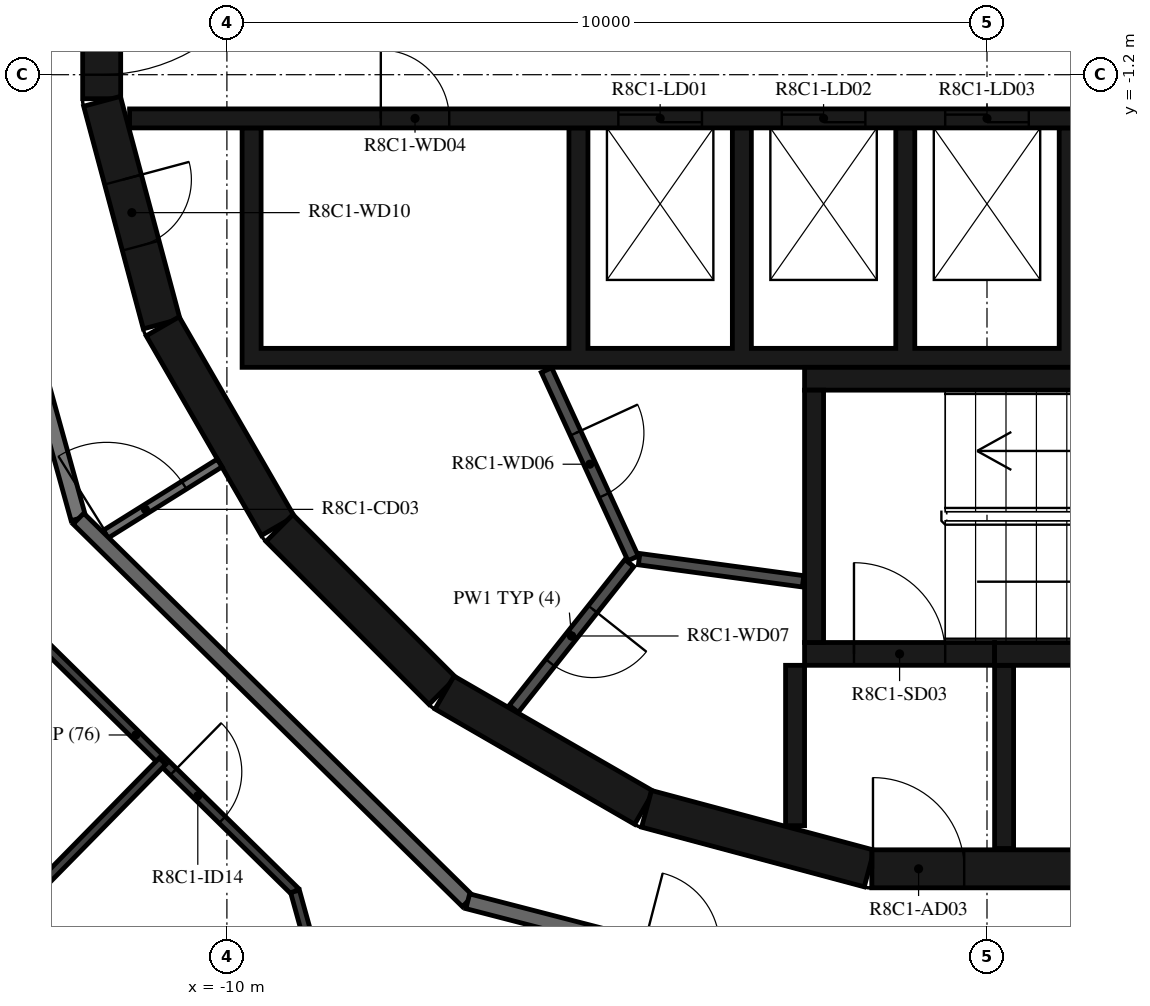
"""IFC4 building model, lengths in metres.
Left out: names, types, materials, properties, quantities, classifications, styles, units other than length and angle.
Written with IfcOpenShell. Run it as: python <this file> out.ifc"""

import sys

from ifc_helpers import new_model, si_unit, direction, frame, frame_2d, origin, place, context, subcontext, project, spatial, polyline, rectangle, outline, extrude, element, fill, save


model = new_model("IFC4")
c1 = context("Model", 3, precision=1e-05, world=origin(), true_north=direction((0.0, 1.0)))
c2 = subcontext(c1, "Body", "Model", "MODEL_VIEW")
j1 = project(units=[si_unit("LENGTHUNIT", "METRE"), si_unit("PLANEANGLEUNIT", "RADIAN")], contexts=[c1])
p1 = place(None, origin())
s1 = spatial("IfcSite", under=j1, at=p1, CompositionType="ELEMENT")
p2 = place(p1, origin())
s2 = spatial("IfcBuilding", under=s1, at=p2, CompositionType="ELEMENT")
p3 = place(p2, frame((0.0, 0.0, 322.7)))
s3 = spatial("IfcBuildingStorey", under=s2, at=p3, CompositionType="ELEMENT", Elevation=322.7)
p4 = place(p3, frame((-11.647, 1.516, 0.0), z_axis=(0.0, 0.0, 1.0), x_axis=(0.0, -1.0, 0.0)))
e1 = element("IfcWall", 1, at=p4, inside=s3, PredefinedType="SHEAR", context=c2, shape_type="SweptSolid", body=[
    extrude(rectangle(XDim=3.033, YDim=0.5, at=frame_2d((1.516, 0.0))), origin(), (0.0, 0.0, 1.0), 3.05),
])
p5 = place(p4, frame((0.316, 0.0, 0.0)))
e2 = element("IfcOpeningElement", 2, at=p5, cuts=e1, PredefinedType="OPENING", context=c2, shape_type="SweptSolid", body=[
    extrude(rectangle(XDim=2.4, YDim=2.1, at=frame_2d((1.2, 1.05))), frame((0.0, 0.26, 0.0), z_axis=(0.0, -1.0, 0.0), x_axis=(1.0, 0.0, 0.0)), (0.0, 0.0, 1.0), 0.52),
])
p6 = place(p3, frame((-11.643, -1.55, 0.0), z_axis=(0.0, 0.0, 1.0), x_axis=(0.258734743916, -0.965948410781, 0.0)))
e3 = element("IfcWall", 3, at=p6, inside=s3, PredefinedType="SHEAR", context=c2, shape_type="SweptSolid", body=[
    extrude(rectangle(XDim=3.033, YDim=0.5, at=frame_2d((1.516, 0.0))), origin(), (0.0, 0.0, 1.0), 3.05),
])
p7 = place(p6, frame((1.066, 0.0, 0.0)))
e4 = element("IfcOpeningElement", 4, at=p7, cuts=e3, PredefinedType="OPENING", context=c2, shape_type="SweptSolid", body=[
    extrude(rectangle(XDim=0.9, YDim=2.1, at=frame_2d((0.45, 1.05))), frame((0.0, 0.26, 0.0), z_axis=(0.0, -1.0, 0.0), x_axis=(1.0, 0.0, 0.0)), (0.0, 0.0, 1.0), 0.52),
])
p8 = place(p3, frame((-10.845, -4.51, 0.0), z_axis=(0.0, 0.0, 1.0), x_axis=(0.500087131594, -0.865975092491, 0.0)))
e5 = element("IfcWall", 5, at=p8, inside=s3, PredefinedType="SHEAR", context=c2, shape_type="SweptSolid", body=[
    extrude(rectangle(XDim=3.033, YDim=0.5, at=frame_2d((1.516, 0.0))), origin(), (0.0, 0.0, 1.0), 3.05),
])
p9 = place(p3, frame((-9.308, -7.164, 0.0), z_axis=(0.0, 0.0, 1.0), x_axis=(0.707106781187, -0.707106781187, 0.0)))
e6 = element("IfcWall", 6, at=p9, inside=s3, PredefinedType="SHEAR", context=c2, shape_type="SweptSolid", body=[
    extrude(rectangle(XDim=3.032, YDim=0.5, at=frame_2d((1.516, 0.0))), origin(), (0.0, 0.0, 1.0), 3.05),
])
for number, where, z_axis, x_axis in (
    (7, (-7.137, -9.329, 0.0), (0.0, 0.0, 1.0), (0.866, -0.5, 0.0)),
    (8, (-4.479, -10.858, 0.0), (0.0, 0.0, 1.0), (0.966, -0.259, 0.0)),
):
    element("IfcWall", number, at=place(p3, frame(where, z_axis=z_axis, x_axis=x_axis)), inside=s3, PredefinedType="SHEAR", context=c2, shape_type="SweptSolid", body=[
        extrude(rectangle(XDim=3.033, YDim=0.5, at=frame_2d((1.516, 0.0))), origin(), (0.0, 0.0, 1.0), 3.05),
    ])
p10 = place(p3, frame((-1.516, -11.647, 0.0), z_axis=(0.0, 0.0, 1.0), x_axis=(1.0, 0.0, 0.0)))
e9 = element("IfcWall", 9, at=p10, inside=s3, PredefinedType="SHEAR", context=c2, shape_type="SweptSolid", body=[
    extrude(rectangle(XDim=3.033, YDim=0.5, at=frame_2d((1.516, 0.0))), origin(), (0.0, 0.0, 1.0), 3.05),
])
p11 = place(p10, frame((0.016, 0.0, 0.0)))
e10 = element("IfcOpeningElement", 10, at=p11, cuts=e9, PredefinedType="OPENING", context=c2, shape_type="SweptSolid", body=[
    extrude(rectangle(XDim=1.2, YDim=2.1, at=frame_2d((0.6, 1.05))), frame((0.0, 0.26, 0.0), z_axis=(0.0, -1.0, 0.0), x_axis=(1.0, 0.0, 0.0)), (0.0, 0.0, 1.0), 0.52),
])
p12 = place(p3, frame((-2.275, -8.67, 0.0), z_axis=(0.0, 0.0, 1.0), x_axis=(0.0, 1.0, 0.0)))
e11 = element("IfcWall", 11, at=p12, inside=s3, PredefinedType="SHEAR", context=c2, shape_type="SweptSolid", body=[
    extrude(rectangle(XDim=3.32, YDim=0.25, at=frame_2d((1.66, 0.0))), origin(), (0.0, 0.0, 1.0), 3.05),
])
p13 = place(p3, frame((-2.4, -5.2, 0.0), z_axis=(0.0, 0.0, 1.0), x_axis=(1.0, 0.0, 0.0)))
e12 = element("IfcWall", 12, at=p13, inside=s3, PredefinedType="SHEAR", context=c2, shape_type="SweptSolid", body=[
    extrude(rectangle(XDim=7.05, YDim=0.3, at=frame_2d((3.525, 0.0))), origin(), (0.0, 0.0, 1.0), 3.05),
])
p14 = place(p3, frame((0.1, -8.82, 0.0), z_axis=(0.0, 0.0, 1.0), x_axis=(1.0, 0.0, 0.0)))
e13 = element("IfcWall", 13, at=p14, inside=s3, PredefinedType="SHEAR", context=c2, shape_type="SweptSolid", body=[
    extrude(rectangle(XDim=4.55, YDim=0.3, at=frame_2d((2.275, 0.0))), origin(), (0.0, 0.0, 1.0), 3.05),
])
p15 = place(p3, frame((-2.4, -8.82, 0.0), z_axis=(0.0, 0.0, 1.0), x_axis=(1.0, 0.0, 0.0)))
e14 = element("IfcWall", 14, at=p15, inside=s3, PredefinedType="SHEAR", context=c2, shape_type="SweptSolid", body=[
    extrude(rectangle(XDim=2.5, YDim=0.3, at=frame_2d((1.25, 0.0))), origin(), (0.0, 0.0, 1.0), 3.05),
])
p16 = place(p15, frame((0.65, 0.0, 0.0)))
e15 = element("IfcOpeningElement", 15, at=p16, cuts=e14, PredefinedType="OPENING", context=c2, shape_type="SweptSolid", body=[
    extrude(rectangle(XDim=1.2, YDim=2.1, at=frame_2d((0.6, 1.05))), frame((0.0, 0.16, 0.0), z_axis=(0.0, -1.0, 0.0), x_axis=(1.0, 0.0, 0.0)), (0.0, 0.0, 1.0), 0.32),
])
p17 = place(p3, frame((-2.525, -8.97, 0.0), z_axis=(0.0, 0.0, 1.0), x_axis=(0.0, -1.0, 0.0)))
e16 = element("IfcWall", 16, at=p17, inside=s3, PredefinedType="SHEAR", context=c2, shape_type="SweptSolid", body=[
    extrude(rectangle(XDim=2.11, YDim=0.25, at=frame_2d((1.055, 0.0))), origin(), (0.0, 0.0, 1.0), 3.05),
])
p18 = place(p3, frame((0.225, -8.97, 0.0), z_axis=(0.0, 0.0, 1.0), x_axis=(0.0, -1.0, 0.0)))
e17 = element("IfcWall", 17, at=p18, inside=s3, PredefinedType="SHEAR", context=c2, shape_type="SweptSolid", body=[
    extrude(rectangle(XDim=2.41, YDim=0.25, at=frame_2d((1.205, 0.0))), origin(), (0.0, 0.0, 1.0), 3.05),
])
p19 = place(p3, origin())
e18 = element("IfcWall", 18, at=p19, inside=s3, PredefinedType="SHEAR", context=c2, shape_type="SweptSolid", body=[
    extrude(outline(polyline([(9.8, -5.05), (9.8, -4.8), (9.8, -1.9), (9.55, -1.9), (9.55, -4.8), (7.65, -4.8), (7.65, -1.9), (7.4, -1.9), (7.4, -4.8), (5.5, -4.8), (5.5, -1.9), (5.25, -1.9), (5.25, -4.8), (3.35, -4.8), (3.35, -1.9), (3.1, -1.9), (3.1, -4.8), (1.2, -4.8), (1.2, -1.9), (0.95, -1.9), (0.95, -4.8), (-0.95, -4.8), (-0.95, -1.9), (-1.2, -1.9), (-1.2, -4.8), (-3.1, -4.8), (-3.1, -1.9), (-3.35, -1.9), (-3.35, -4.8), (-5.25, -4.8), (-5.25, -1.9), (-5.5, -1.9), (-5.5, -4.8), (-9.55, -4.8), (-9.55, -1.9), (-9.8, -1.9), (-9.8, -4.8), (-9.8, -5.05), (9.8, -5.05)])), origin(), (0.0, 0.0, 1.0), 3.05),
])
p20 = place(p3, frame((-11.28, -1.775, 0.0), z_axis=(0.0, 0.0, 1.0), x_axis=(1.0, 0.0, 0.0)))
e19 = element("IfcWall", 19, at=p20, inside=s3, PredefinedType="SHEAR", context=c2, shape_type="SweptSolid", body=[
    extrude(rectangle(XDim=14.38, YDim=0.25, at=frame_2d((7.19, 0.0))), origin(), (0.0, 0.0, 1.0), 3.05),
])
p21 = place(p20, frame((6.43, 0.0, 0.0)))
e20 = element("IfcOpeningElement", 20, at=p21, cuts=e19, PredefinedType="OPENING", context=c2, shape_type="SweptSolid", body=[
    extrude(rectangle(XDim=1.1, YDim=2.1, at=frame_2d((0.55, 1.05))), frame((0.0, 0.135, 0.0), z_axis=(0.0, -1.0, 0.0), x_axis=(1.0, 0.0, 0.0)), (0.0, 0.0, 1.0), 0.27),
])
p22 = place(p20, frame((8.58, 0.0, 0.0)))
e21 = element("IfcOpeningElement", 21, at=p22, cuts=e19, PredefinedType="OPENING", context=c2, shape_type="SweptSolid", body=[
    extrude(rectangle(XDim=1.1, YDim=2.1, at=frame_2d((0.55, 1.05))), frame((0.0, 0.135, 0.0), z_axis=(0.0, -1.0, 0.0), x_axis=(1.0, 0.0, 0.0)), (0.0, 0.0, 1.0), 0.27),
])
p23 = place(p20, frame((10.73, 0.0, 0.0)))
e22 = element("IfcOpeningElement", 22, at=p23, cuts=e19, PredefinedType="OPENING", context=c2, shape_type="SweptSolid", body=[
    extrude(rectangle(XDim=1.1, YDim=2.1, at=frame_2d((0.55, 1.05))), frame((0.0, 0.135, 0.0), z_axis=(0.0, -1.0, 0.0), x_axis=(1.0, 0.0, 0.0)), (0.0, 0.0, 1.0), 0.27),
])
p24 = place(p20, frame((3.305, 0.0, 0.0)))
e23 = element("IfcOpeningElement", 23, at=p24, cuts=e19, PredefinedType="OPENING", context=c2, shape_type="SweptSolid", body=[
    extrude(rectangle(XDim=0.9, YDim=2.1, at=frame_2d((0.45, 1.05))), frame((0.0, 0.135, 0.0), z_axis=(0.0, -1.0, 0.0), x_axis=(1.0, 0.0, 0.0)), (0.0, 0.0, 1.0), 0.27),
])
p25 = place(p20, frame((12.98, 0.0, 0.0)))
e24 = element("IfcOpeningElement", 24, at=p25, cuts=e19, PredefinedType="OPENING", context=c2, shape_type="SweptSolid", body=[
    extrude(rectangle(XDim=0.9, YDim=2.1, at=frame_2d((0.45, 1.05))), frame((0.0, 0.135, 0.0), z_axis=(0.0, -1.0, 0.0), x_axis=(1.0, 0.0, 0.0)), (0.0, 0.0, 1.0), 0.27),
])
p26 = place(p3, frame((-5.795, -5.086, 0.0), z_axis=(0.0, 0.0, 1.0), x_axis=(0.417887867606, -0.908498613157, 0.0)))
e25 = element("IfcWall", 25, at=p26, inside=s3, PredefinedType="PARTITIONING", context=c2, shape_type="SweptSolid", body=[
    extrude(rectangle(XDim=2.726, YDim=0.15, at=frame_2d((1.363, 0.0))), origin(), (0.0, 0.0, 1.0), 3.05),
])
p27 = place(p26, frame((0.913, 0.0, 0.0)))
e26 = element("IfcOpeningElement", 26, at=p27, cuts=e25, PredefinedType="OPENING", context=c2, shape_type="SweptSolid", body=[
    extrude(rectangle(XDim=0.9, YDim=2.1, at=frame_2d((0.45, 1.05))), frame((0.0, 0.085, 0.0), z_axis=(0.0, -1.0, 0.0), x_axis=(1.0, 0.0, 0.0)), (0.0, 0.0, 1.0), 0.17),
])
p28 = place(p3, frame((-4.706, -7.625, 0.0), z_axis=(0.0, 0.0, 1.0), x_axis=(-0.621392599334, -0.783499353856, 0.0)))
e27 = element("IfcWall", 27, at=p28, inside=s3, PredefinedType="PARTITIONING", context=c2, shape_type="SweptSolid", body=[
    extrude(rectangle(XDim=2.447, YDim=0.15, at=frame_2d((1.224, 0.0))), origin(), (0.0, 0.0, 1.0), 3.05),
])
p29 = place(p28, frame((0.774, 0.0, 0.0)))
e28 = element("IfcOpeningElement", 28, at=p29, cuts=e27, PredefinedType="OPENING", context=c2, shape_type="SweptSolid", body=[
    extrude(rectangle(XDim=0.9, YDim=2.1, at=frame_2d((0.45, 1.05))), frame((0.0, 0.085, 0.0), z_axis=(0.0, -1.0, 0.0), x_axis=(1.0, 0.0, 0.0)), (0.0, 0.0, 1.0), 0.17),
])
p30 = place(p3, frame((-2.42, -7.865, 0.0), z_axis=(0.0, 0.0, 1.0), x_axis=(-0.990972299108, 0.134066783362, 0.0)))
e29 = element("IfcWall", 29, at=p30, inside=s3, PredefinedType="PARTITIONING", context=c2, shape_type="SweptSolid", body=[
    extrude(rectangle(XDim=2.176, YDim=0.15, at=frame_2d((1.088, 0.0))), origin(), (0.0, 0.0, 1.0), 3.05),
])
p31 = place(p3, frame((-11.687, -7.303, 0.0), z_axis=(0.0, 0.0, 1.0), x_axis=(0.848064094072, 0.529893661357, 0.0)))
e30 = element("IfcWall", 30, at=p31, inside=s3, PredefinedType="PARTITIONING", context=c2, shape_type="SweptSolid", body=[
    extrude(rectangle(XDim=1.876, YDim=0.12, at=frame_2d((0.938, 0.0))), origin(), (0.0, 0.0, 1.0), 3.05),
])
p32 = place(p31, frame((0.125, 0.0, 0.0)))
e31 = element("IfcOpeningElement", 31, at=p32, cuts=e30, PredefinedType="OPENING", context=c2, shape_type="SweptSolid", body=[
    extrude(rectangle(XDim=1.2, YDim=2.1, at=frame_2d((0.6, 1.05))), frame((0.0, 0.07, 0.0), z_axis=(0.0, -1.0, 0.0), x_axis=(1.0, 0.0, 0.0)), (0.0, 0.0, 1.0), 0.14),
])
p33 = place(p3, frame((-13.872, -0.121, 0.0), z_axis=(0.0, 0.0, 1.0), x_axis=(0.267254575108, -0.963625960674, 0.0)))
e32 = element("IfcWall", 32, at=p33, inside=s3, PredefinedType="STANDARD", context=c2, shape_type="SweptSolid", body=[
    extrude(rectangle(XDim=7.181, YDim=0.2, at=frame_2d((3.591, 0.0))), origin(), (0.0, 0.0, 1.0), 3.05),
])
p34 = place(p3, frame((-11.953, -7.041, 0.0), z_axis=(0.0, 0.0, 1.0), x_axis=(0.713250549143, -0.70090916255, 0.0)))
e33 = element("IfcWall", 33, at=p34, inside=s3, PredefinedType="STANDARD", context=c2, shape_type="SweptSolid", body=[
    extrude(rectangle(XDim=7.181, YDim=0.2, at=frame_2d((3.59, 0.0))), origin(), (0.0, 0.0, 1.0), 3.05),
])
p35 = place(p3, frame((-6.831, -12.074, 0.0), z_axis=(0.0, 0.0, 1.0), x_axis=(0.968144780225, -0.250391063186, 0.0)))
e34 = element("IfcWall", 34, at=p35, inside=s3, PredefinedType="STANDARD", context=c2, shape_type="SweptSolid", body=[
    extrude(rectangle(XDim=7.181, YDim=0.2, at=frame_2d((3.591, 0.0))), origin(), (0.0, 0.0, 1.0), 3.05),
])
p36 = place(p35, frame((2.39, 0.0, 0.0)))
e35 = element("IfcOpeningElement", 35, at=p36, cuts=e34, PredefinedType="OPENING", context=c2, shape_type="SweptSolid", body=[
    extrude(rectangle(XDim=1.0, YDim=2.1, at=frame_2d((0.5, 1.05))), frame((0.0, 0.11, 0.0), z_axis=(0.0, -1.0, 0.0), x_axis=(1.0, 0.0, 0.0)), (0.0, 0.0, 1.0), 0.22),
])
p37 = place(p35, frame((5.69, 0.0, 0.0)))
e36 = element("IfcOpeningElement", 36, at=p37, cuts=e34, PredefinedType="OPENING", context=c2, shape_type="SweptSolid", body=[
    extrude(rectangle(XDim=1.0, YDim=2.1, at=frame_2d((0.5, 1.05))), frame((0.0, 0.11, 0.0), z_axis=(0.0, -1.0, 0.0), x_axis=(1.0, 0.0, 0.0)), (0.0, 0.0, 1.0), 0.22),
])
p38 = place(p3, frame((0.121, -13.872, 0.0), z_axis=(0.0, 0.0, 1.0), x_axis=(0.963625960674, 0.267254575108, 0.0)))
e37 = element("IfcWall", 37, at=p38, inside=s3, PredefinedType="STANDARD", context=c2, shape_type="SweptSolid", body=[
    extrude(rectangle(XDim=7.181, YDim=0.2, at=frame_2d((3.591, 0.0))), origin(), (0.0, 0.0, 1.0), 3.05),
])
p39 = place(p3, frame((-13.291, -7.829, 0.0), z_axis=(0.0, 0.0, 1.0), x_axis=(0.713255094589, -0.700904537039, 0.0)))
e38 = element("IfcWall", 38, at=p39, inside=s3, PredefinedType="PARTITIONING", context=c2, shape_type="SweptSolid", body=[
    extrude(rectangle(XDim=5.871, YDim=0.12, at=frame_2d((2.936, 0.0))), origin(), (0.0, 0.0, 1.0), 3.05),
])
p40 = place(p39, frame((3.627, 0.0, 0.0)))
e39 = element("IfcOpeningElement", 39, at=p40, cuts=e38, PredefinedType="OPENING", context=c2, shape_type="SweptSolid", body=[
    extrude(rectangle(XDim=0.9, YDim=2.1, at=frame_2d((0.45, 1.05))), frame((0.0, 0.07, 0.0), z_axis=(0.0, -1.0, 0.0), x_axis=(1.0, 0.0, 0.0)), (0.0, 0.0, 1.0), 0.14),
])
p41 = place(p3, frame((-9.104, -11.944, 0.0), z_axis=(0.0, 0.0, 1.0), x_axis=(0.267317596771, -0.963608479859, 0.0)))
e40 = element("IfcWall", 40, at=p41, inside=s3, PredefinedType="PARTITIONING", context=c2, shape_type="SweptSolid", body=[
    extrude(rectangle(XDim=1.042, YDim=0.12, at=frame_2d((0.521, 0.0))), origin(), (0.0, 0.0, 1.0), 3.05),
])
p42 = place(p3, frame((-14.066, -13.508, 0.0), z_axis=(0.0, 0.0, 1.0), x_axis=(0.700941781432, 0.7132184932, 0.0)))
e41 = element("IfcWall", 41, at=p42, inside=s3, PredefinedType="PARTITIONING", context=c2, shape_type="SweptSolid", body=[
    extrude(rectangle(XDim=4.594, YDim=0.12, at=frame_2d((2.297, 0.0))), origin(), (0.0, 0.0, 1.0), 3.05),
])
p43 = place(p16, origin())
e42 = element("IfcDoor", 42, at=p43, inside=s3, OperationType="SINGLE_SWING_LEFT", PredefinedType="DOOR", context=c2, shape_type="SweptSolid", body=[
    extrude(rectangle(XDim=1.2, YDim=2.1, at=frame_2d((0.6, 1.05))), frame((0.0, 0.025, 0.0), z_axis=(0.0, -1.0, 0.0), x_axis=(1.0, 0.0, 0.0)), (0.0, 0.0, 1.0), 0.05),
])
fill(e15, e42)
p44 = place(p11, origin())
e43 = element("IfcDoor", 43, at=p44, inside=s3, OperationType="SINGLE_SWING_RIGHT", PredefinedType="DOOR", context=c2, shape_type="SweptSolid", body=[
    extrude(rectangle(XDim=1.2, YDim=2.1, at=frame_2d((0.6, 1.05))), frame((0.0, 0.025, 0.0), z_axis=(0.0, -1.0, 0.0), x_axis=(1.0, 0.0, 0.0)), (0.0, 0.0, 1.0), 0.05),
])
fill(e10, e43)
p45 = place(p5, origin())
e44 = element("IfcDoor", 44, at=p45, inside=s3, OperationType="DOUBLE_DOOR_SINGLE_SWING", PredefinedType="DOOR", context=c2, shape_type="SweptSolid", body=[
    extrude(rectangle(XDim=2.4, YDim=2.1, at=frame_2d((1.2, 1.05))), frame((0.0, 0.025, 0.0), z_axis=(0.0, -1.0, 0.0), x_axis=(1.0, 0.0, 0.0)), (0.0, 0.0, 1.0), 0.05),
])
fill(e2, e44)
p46 = place(p21, origin())
e45 = element("IfcDoor", 45, at=p46, inside=s3, OperationType="DOUBLE_DOOR_SLIDING", PredefinedType="DOOR", context=c2, shape_type="SweptSolid", body=[
    extrude(rectangle(XDim=1.1, YDim=2.1, at=frame_2d((0.55, 1.05))), frame((0.0, 0.025, 0.0), z_axis=(0.0, -1.0, 0.0), x_axis=(1.0, 0.0, 0.0)), (0.0, 0.0, 1.0), 0.05),
])
fill(e20, e45)
p47 = place(p22, origin())
e46 = element("IfcDoor", 46, at=p47, inside=s3, OperationType="DOUBLE_DOOR_SLIDING", PredefinedType="DOOR", context=c2, shape_type="SweptSolid", body=[
    extrude(rectangle(XDim=1.1, YDim=2.1, at=frame_2d((0.55, 1.05))), frame((0.0, 0.025, 0.0), z_axis=(0.0, -1.0, 0.0), x_axis=(1.0, 0.0, 0.0)), (0.0, 0.0, 1.0), 0.05),
])
fill(e21, e46)
p48 = place(p23, origin())
e47 = element("IfcDoor", 47, at=p48, inside=s3, OperationType="DOUBLE_DOOR_SLIDING", PredefinedType="DOOR", context=c2, shape_type="SweptSolid", body=[
    extrude(rectangle(XDim=1.1, YDim=2.1, at=frame_2d((0.55, 1.05))), frame((0.0, 0.025, 0.0), z_axis=(0.0, -1.0, 0.0), x_axis=(1.0, 0.0, 0.0)), (0.0, 0.0, 1.0), 0.05),
])
fill(e22, e47)
p49 = place(p24, origin())
e48 = element("IfcDoor", 48, at=p49, inside=s3, OperationType="SINGLE_SWING_RIGHT", PredefinedType="DOOR", context=c2, shape_type="SweptSolid", body=[
    extrude(rectangle(XDim=0.9, YDim=2.1, at=frame_2d((0.45, 1.05))), frame((0.0, 0.025, 0.0), z_axis=(0.0, -1.0, 0.0), x_axis=(1.0, 0.0, 0.0)), (0.0, 0.0, 1.0), 0.05),
])
fill(e23, e48)
p50 = place(p27, origin())
e49 = element("IfcDoor", 49, at=p50, inside=s3, OperationType="SINGLE_SWING_RIGHT", PredefinedType="DOOR", context=c2, shape_type="SweptSolid", body=[
    extrude(rectangle(XDim=0.9, YDim=2.1, at=frame_2d((0.45, 1.05))), frame((0.0, 0.025, 0.0), z_axis=(0.0, -1.0, 0.0), x_axis=(1.0, 0.0, 0.0)), (0.0, 0.0, 1.0), 0.05),
])
fill(e26, e49)
p51 = place(p29, origin())
e50 = element("IfcDoor", 50, at=p51, inside=s3, OperationType="SINGLE_SWING_LEFT", PredefinedType="DOOR", context=c2, shape_type="SweptSolid", body=[
    extrude(rectangle(XDim=0.9, YDim=2.1, at=frame_2d((0.45, 1.05))), frame((0.0, 0.025, 0.0), z_axis=(0.0, -1.0, 0.0), x_axis=(1.0, 0.0, 0.0)), (0.0, 0.0, 1.0), 0.05),
])
fill(e28, e50)
p52 = place(p7, origin())
e51 = element("IfcDoor", 51, at=p52, inside=s3, OperationType="SINGLE_SWING_RIGHT", PredefinedType="DOOR", context=c2, shape_type="SweptSolid", body=[
    extrude(rectangle(XDim=0.9, YDim=2.1, at=frame_2d((0.45, 1.05))), frame((0.0, 0.025, 0.0), z_axis=(0.0, -1.0, 0.0), x_axis=(1.0, 0.0, 0.0)), (0.0, 0.0, 1.0), 0.05),
])
fill(e4, e51)
p53 = place(p40, origin())
e52 = element("IfcDoor", 52, at=p53, inside=s3, OperationType="SINGLE_SWING_RIGHT", PredefinedType="DOOR", context=c2, shape_type="SweptSolid", body=[
    extrude(rectangle(XDim=0.9, YDim=2.1, at=frame_2d((0.45, 1.05))), frame((0.0, 0.025, 0.0), z_axis=(0.0, -1.0, 0.0), x_axis=(1.0, 0.0, 0.0)), (0.0, 0.0, 1.0), 0.05),
])
fill(e39, e52)
p54 = place(p32, origin())
e53 = element("IfcDoor", 53, at=p54, inside=s3, OperationType="DOUBLE_DOOR_SINGLE_SWING", PredefinedType="DOOR", context=c2, shape_type="SweptSolid", body=[
    extrude(rectangle(XDim=1.2, YDim=2.1, at=frame_2d((0.6, 1.05))), frame((0.0, 0.025, 0.0), z_axis=(0.0, -1.0, 0.0), x_axis=(1.0, 0.0, 0.0)), (0.0, 0.0, 1.0), 0.05),
])
fill(e31, e53)
save(model, sys.argv[1])
